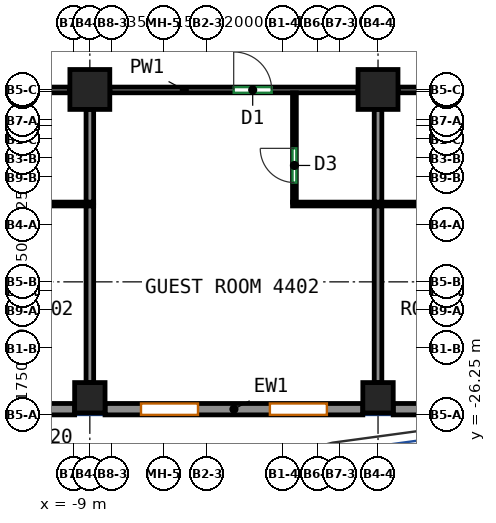
"""IFC4 building model, lengths in metres.
Left out: names, types, materials, properties, quantities, classifications, styles, units other than length and angle.
Written with IfcOpenShell. Run it as: python <this file> out.ifc"""

import sys

from ifc_helpers import new_model, si_unit, direction, frame, frame_2d, origin, origin_2d, place, context, subcontext, project, spatial, rectangle, extrude, source, transform, mapped, element, fill, save


model = new_model("IFC4")
c1 = context("Model", 3, precision=1e-05, world=origin(), true_north=direction((0.0, 1.0)))
c2 = subcontext(c1, "Body", "Model", "MODEL_VIEW")
j1 = project(units=[si_unit("LENGTHUNIT", "METRE"), si_unit("PLANEANGLEUNIT", "RADIAN")], contexts=[c1])
p1 = place(None, origin())
s1 = spatial("IfcSite", under=j1, at=p1, CompositionType="ELEMENT")
p2 = place(p1, origin())
s2 = spatial("IfcBuilding", under=s1, at=p2, CompositionType="ELEMENT")
p3 = place(p2, frame((0.0, 0.0, 185.5)))
s3 = spatial("IfcBuildingStorey", under=s2, at=p3, CompositionType="ELEMENT", Elevation=185.5)
m1 = source(origin(), c2, "Body", "SweptSolid", [
    extrude(rectangle(XDim=0.8, YDim=0.8, at=origin_2d()), origin(), (0.0, 0.0, 1.0), 3.12),
])
p4 = place(p3, frame((-8.583, -25.8, 0.0), z_axis=(0.0, 0.0, 1.0), x_axis=(1.0, 0.0, 0.0)))
e1 = element("IfcColumn", 1, at=p4, inside=s3, PredefinedType="COLUMN", context=c2, shape_type="MappedRepresentation", body=[
    mapped(m1, transform((0.0, 0.0, 0.0))),
])
m2 = source(origin(), c2, "Body", "SweptSolid", [
    extrude(rectangle(XDim=1.05, YDim=1.05, at=origin_2d()), origin(), (0.0, 0.0, 1.0), 3.12),
])
p5 = place(p3, frame((-8.583, -17.688, 0.0), z_axis=(0.0, 0.0, 1.0), x_axis=(1.0, 0.0, 0.0)))
e2 = element("IfcColumn", 2, at=p5, inside=s3, PredefinedType="COLUMN", context=c2, shape_type="MappedRepresentation", body=[
    mapped(m2, transform((0.0, 0.0, 0.0))),
])
p6 = place(p3, frame((-1.0, -25.8, 0.0), z_axis=(0.0, 0.0, 1.0), x_axis=(1.0, 0.0, 0.0)))
e3 = element("IfcColumn", 3, at=p6, inside=s3, PredefinedType="COLUMN", context=c2, shape_type="MappedRepresentation", body=[
    mapped(m1, transform((0.0, 0.0, 0.0))),
])
p7 = place(p3, frame((-1.0, -17.688, 0.0), z_axis=(0.0, 0.0, 1.0), x_axis=(1.0, 0.0, 0.0)))
e4 = element("IfcColumn", 4, at=p7, inside=s3, PredefinedType="COLUMN", context=c2, shape_type="MappedRepresentation", body=[
    mapped(m2, transform((0.0, 0.0, 0.0))),
])
m3 = source(origin(), c2, "Body", "SweptSolid", [
    extrude(rectangle(XDim=6.783, YDim=0.3, at=frame_2d((3.392, 0.0))), origin(), (0.0, 0.0, 1.0), 3.12),
])
p8 = place(p3, frame((-15.767, -26.1, 0.0), z_axis=(0.0, 0.0, 1.0), x_axis=(1.0, 0.0, 0.0)))
e5 = element("IfcWall", 5, at=p8, inside=s3, PredefinedType="SOLIDWALL", context=c2, shape_type="MappedRepresentation", body=[
    mapped(m3, transform((0.0, 0.0, 0.0))),
])
p9 = place(p8, frame((0.946, 0.0, 0.85)))
e6 = element("IfcOpeningElement", 6, at=p9, cuts=e5, PredefinedType="OPENING", context=c2, shape_type="SweptSolid", body=[
    extrude(rectangle(XDim=1.5, YDim=1.95, at=frame_2d((0.75, 0.975))), frame((0.0, 0.16, 0.0), z_axis=(0.0, -1.0, 0.0), x_axis=(1.0, 0.0, 0.0)), (0.0, 0.0, 1.0), 0.32),
])
p10 = place(p8, frame((4.338, 0.0, 0.85)))
e7 = element("IfcOpeningElement", 7, at=p10, cuts=e5, PredefinedType="OPENING", context=c2, shape_type="SweptSolid", body=[
    extrude(rectangle(XDim=1.5, YDim=1.95, at=frame_2d((0.75, 0.975))), frame((0.0, 0.16, 0.0), z_axis=(0.0, -1.0, 0.0), x_axis=(1.0, 0.0, 0.0)), (0.0, 0.0, 1.0), 0.32),
])
m4 = source(origin(), c2, "Body", "SweptSolid", [
    extrude(rectangle(XDim=6.783, YDim=0.3, at=frame_2d((3.392, 0.0))), origin(), (0.0, 0.0, 1.0), 3.12),
])
p11 = place(p3, frame((-8.183, -26.1, 0.0), z_axis=(0.0, 0.0, 1.0), x_axis=(1.0, 0.0, 0.0)))
e8 = element("IfcWall", 8, at=p11, inside=s3, PredefinedType="SOLIDWALL", context=c2, shape_type="MappedRepresentation", body=[
    mapped(m4, transform((0.0, 0.0, 0.0))),
])
p12 = place(p11, frame((0.946, 0.0, 0.85)))
e9 = element("IfcOpeningElement", 9, at=p12, cuts=e8, PredefinedType="OPENING", context=c2, shape_type="SweptSolid", body=[
    extrude(rectangle(XDim=1.5, YDim=1.95, at=frame_2d((0.75, 0.975))), frame((0.0, 0.16, 0.0), z_axis=(0.0, -1.0, 0.0), x_axis=(1.0, 0.0, 0.0)), (0.0, 0.0, 1.0), 0.32),
])
p13 = place(p11, frame((4.337, 0.0, 0.85)))
e10 = element("IfcOpeningElement", 10, at=p13, cuts=e8, PredefinedType="OPENING", context=c2, shape_type="SweptSolid", body=[
    extrude(rectangle(XDim=1.5, YDim=1.95, at=frame_2d((0.75, 0.975))), frame((0.0, 0.16, 0.0), z_axis=(0.0, -1.0, 0.0), x_axis=(1.0, 0.0, 0.0)), (0.0, 0.0, 1.0), 0.32),
])
p14 = place(p3, frame((-0.6, -26.1, 0.0), z_axis=(0.0, 0.0, 1.0), x_axis=(1.0, 0.0, 0.0)))
e11 = element("IfcWall", 11, at=p14, inside=s3, PredefinedType="SOLIDWALL", context=c2, shape_type="MappedRepresentation", body=[
    mapped(m4, transform((0.0, 0.0, 0.0))),
])
p15 = place(p14, frame((0.946, 0.0, 0.85)))
e12 = element("IfcOpeningElement", 12, at=p15, cuts=e11, PredefinedType="OPENING", context=c2, shape_type="SweptSolid", body=[
    extrude(rectangle(XDim=1.5, YDim=1.95, at=frame_2d((0.75, 0.975))), frame((0.0, 0.16, 0.0), z_axis=(0.0, -1.0, 0.0), x_axis=(1.0, 0.0, 0.0)), (0.0, 0.0, 1.0), 0.32),
])
p16 = place(p14, frame((4.337, 0.0, 0.85)))
e13 = element("IfcOpeningElement", 13, at=p16, cuts=e11, PredefinedType="OPENING", context=c2, shape_type="SweptSolid", body=[
    extrude(rectangle(XDim=1.5, YDim=1.95, at=frame_2d((0.75, 0.975))), frame((0.0, 0.16, 0.0), z_axis=(0.0, -1.0, 0.0), x_axis=(1.0, 0.0, 0.0)), (0.0, 0.0, 1.0), 0.32),
])
p17 = place(p3, frame((-15.642, -17.7, 0.0), z_axis=(0.0, 0.0, 1.0), x_axis=(1.0, 0.0, 0.0)))
e14 = element("IfcWall", 14, at=p17, inside=s3, PredefinedType="PARTITIONING", context=c2, shape_type="SweptSolid", body=[
    extrude(rectangle(XDim=6.534, YDim=0.15, at=frame_2d((3.267, 0.0))), origin(), (0.0, 0.0, 1.0), 3.12),
])
p18 = place(p17, frame((3.563, 0.0, 0.0)))
e15 = element("IfcOpeningElement", 15, at=p18, cuts=e14, PredefinedType="OPENING", context=c2, shape_type="SweptSolid", body=[
    extrude(rectangle(XDim=1.0, YDim=2.1, at=frame_2d((0.5, 1.05))), frame((0.0, 0.085, 0.0), z_axis=(0.0, -1.0, 0.0), x_axis=(1.0, 0.0, 0.0)), (0.0, 0.0, 1.0), 0.17),
])
p19 = place(p3, frame((-8.058, -17.7, 0.0), z_axis=(0.0, 0.0, 1.0), x_axis=(1.0, 0.0, 0.0)))
e16 = element("IfcWall", 16, at=p19, inside=s3, PredefinedType="PARTITIONING", context=c2, shape_type="SweptSolid", body=[
    extrude(rectangle(XDim=6.533, YDim=0.15, at=frame_2d((3.267, 0.0))), origin(), (0.0, 0.0, 1.0), 3.12),
])
p20 = place(p19, frame((3.26, 0.0, 0.0)))
e17 = element("IfcOpeningElement", 17, at=p20, cuts=e16, PredefinedType="OPENING", context=c2, shape_type="SweptSolid", body=[
    extrude(rectangle(XDim=1.0, YDim=2.1, at=frame_2d((0.5, 1.05))), frame((0.0, 0.085, 0.0), z_axis=(0.0, -1.0, 0.0), x_axis=(1.0, 0.0, 0.0)), (0.0, 0.0, 1.0), 0.17),
])
p21 = place(p3, frame((-0.475, -17.7, 0.0), z_axis=(0.0, 0.0, 1.0), x_axis=(1.0, 0.0, 0.0)))
e18 = element("IfcWall", 18, at=p21, inside=s3, PredefinedType="PARTITIONING", context=c2, shape_type="SweptSolid", body=[
    extrude(rectangle(XDim=6.533, YDim=0.15, at=frame_2d((3.267, 0.0))), origin(), (0.0, 0.0, 1.0), 3.12),
])
p22 = place(p21, frame((1.926, 0.0, 0.0)))
e19 = element("IfcOpeningElement", 19, at=p22, cuts=e18, PredefinedType="OPENING", context=c2, shape_type="SweptSolid", body=[
    extrude(rectangle(XDim=1.0, YDim=2.1, at=frame_2d((0.5, 1.05))), frame((0.0, 0.085, 0.0), z_axis=(0.0, -1.0, 0.0), x_axis=(1.0, 0.0, 0.0)), (0.0, 0.0, 1.0), 0.17),
])
p23 = place(p21, frame((3.387, 0.0, 0.0)))
e20 = element("IfcOpeningElement", 20, at=p23, cuts=e18, PredefinedType="OPENING", context=c2, shape_type="SweptSolid", body=[
    extrude(rectangle(XDim=1.0, YDim=2.1, at=frame_2d((0.5, 1.05))), frame((0.0, 0.085, 0.0), z_axis=(0.0, -1.0, 0.0), x_axis=(1.0, 0.0, 0.0)), (0.0, 0.0, 1.0), 0.17),
])
p24 = place(p3, frame((-10.833, -20.702, 0.0), z_axis=(0.0, 0.0, 1.0), x_axis=(1.0, 0.0, 0.0)))
e21 = element("IfcWall", 21, at=p24, inside=s3, PredefinedType="PARTITIONING", context=c2, shape_type="SweptSolid", body=[
    extrude(rectangle(XDim=2.35, YDim=0.1, at=frame_2d((1.175, 0.0))), origin(), (0.0, 0.0, 1.0), 3.12),
])
p25 = place(p3, frame((-8.583, -25.4, 0.0), z_axis=(0.0, 0.0, 1.0), x_axis=(0.0, 1.0, 0.0)))
e22 = element("IfcWall", 22, at=p25, inside=s3, PredefinedType="PARTITIONING", context=c2, shape_type="SweptSolid", body=[
    extrude(rectangle(XDim=4.648, YDim=0.2, at=frame_2d((2.324, 0.0))), origin(), (0.0, 0.0, 1.0), 3.12),
])
p26 = place(p3, frame((-8.583, -20.652, 0.0), z_axis=(0.0, 0.0, 1.0), x_axis=(0.0, 1.0, 0.0)))
e23 = element("IfcWall", 23, at=p26, inside=s3, PredefinedType="PARTITIONING", context=c2, shape_type="SweptSolid", body=[
    extrude(rectangle(XDim=2.44, YDim=0.2, at=frame_2d((1.22, 0.0))), origin(), (0.0, 0.0, 1.0), 3.12),
])
p27 = place(p3, frame((-3.2, -20.652, 0.0), z_axis=(0.0, 0.0, 1.0), x_axis=(0.0, 1.0, 0.0)))
e24 = element("IfcWall", 24, at=p27, inside=s3, PredefinedType="PARTITIONING", context=c2, shape_type="SweptSolid", body=[
    extrude(rectangle(XDim=2.875, YDim=0.1, at=frame_2d((1.438, 0.0))), origin(), (0.0, 0.0, 1.0), 3.12),
])
p28 = place(p27, frame((0.515, 0.0, 0.0)))
e25 = element("IfcOpeningElement", 25, at=p28, cuts=e24, PredefinedType="OPENING", context=c2, shape_type="SweptSolid", body=[
    extrude(rectangle(XDim=0.9, YDim=2.1, at=frame_2d((0.45, 1.05))), frame((0.0, 0.06, 0.0), z_axis=(0.0, -1.0, 0.0), x_axis=(1.0, 0.0, 0.0)), (0.0, 0.0, 1.0), 0.12),
])
p29 = place(p3, frame((-3.25, -20.702, 0.0), z_axis=(0.0, 0.0, 1.0), x_axis=(1.0, 0.0, 0.0)))
e26 = element("IfcWall", 26, at=p29, inside=s3, PredefinedType="PARTITIONING", context=c2, shape_type="SweptSolid", body=[
    extrude(rectangle(XDim=4.5, YDim=0.1, at=frame_2d((2.25, 0.0))), origin(), (0.0, 0.0, 1.0), 3.12),
])
p30 = place(p3, frame((-1.0, -25.4, 0.0), z_axis=(0.0, 0.0, 1.0), x_axis=(0.0, 1.0, 0.0)))
e27 = element("IfcWall", 27, at=p30, inside=s3, PredefinedType="PARTITIONING", context=c2, shape_type="SweptSolid", body=[
    extrude(rectangle(XDim=4.648, YDim=0.2, at=frame_2d((2.324, 0.0))), origin(), (0.0, 0.0, 1.0), 3.12),
])
p31 = place(p3, frame((-1.0, -20.652, 0.0), z_axis=(0.0, 0.0, 1.0), x_axis=(0.0, 1.0, 0.0)))
e28 = element("IfcWall", 28, at=p31, inside=s3, PredefinedType="PARTITIONING", context=c2, shape_type="SweptSolid", body=[
    extrude(rectangle(XDim=2.44, YDim=0.2, at=frame_2d((1.22, 0.0))), origin(), (0.0, 0.0, 1.0), 3.12),
])
p32 = place(p12, origin())
e29 = element("IfcWindow", 29, at=p32, inside=s3, PartitioningType="SINGLE_PANEL", PredefinedType="WINDOW", context=c2, shape_type="SweptSolid", body=[
    extrude(rectangle(XDim=1.5, YDim=1.95, at=frame_2d((0.75, 0.975))), frame((0.0, 0.03, 0.0), z_axis=(0.0, -1.0, 0.0), x_axis=(1.0, 0.0, 0.0)), (0.0, 0.0, 1.0), 0.06),
])
fill(e9, e29)
p33 = place(p13, origin())
e30 = element("IfcWindow", 30, at=p33, inside=s3, PartitioningType="SINGLE_PANEL", PredefinedType="WINDOW", context=c2, shape_type="SweptSolid", body=[
    extrude(rectangle(XDim=1.5, YDim=1.95, at=frame_2d((0.75, 0.975))), frame((0.0, 0.03, 0.0), z_axis=(0.0, -1.0, 0.0), x_axis=(1.0, 0.0, 0.0)), (0.0, 0.0, 1.0), 0.06),
])
fill(e10, e30)
p34 = place(p28, origin())
e31 = element("IfcDoor", 31, at=p34, inside=s3, OperationType="SINGLE_SWING_RIGHT", PredefinedType="DOOR", context=c2, shape_type="SweptSolid", body=[
    extrude(rectangle(XDim=0.9, YDim=2.1, at=frame_2d((0.45, 1.05))), frame((0.0, 0.025, 0.0), z_axis=(0.0, -1.0, 0.0), x_axis=(1.0, 0.0, 0.0)), (0.0, 0.0, 1.0), 0.05),
])
fill(e25, e31)
p35 = place(p20, origin())
e32 = element("IfcDoor", 32, at=p35, inside=s3, OperationType="SINGLE_SWING_LEFT", PredefinedType="DOOR", context=c2, shape_type="SweptSolid", body=[
    extrude(rectangle(XDim=1.0, YDim=2.1, at=frame_2d((0.5, 1.05))), frame((0.0, 0.025, 0.0), z_axis=(0.0, -1.0, 0.0), x_axis=(1.0, 0.0, 0.0)), (0.0, 0.0, 1.0), 0.05),
])
fill(e17, e32)
save(model, sys.argv[1])
